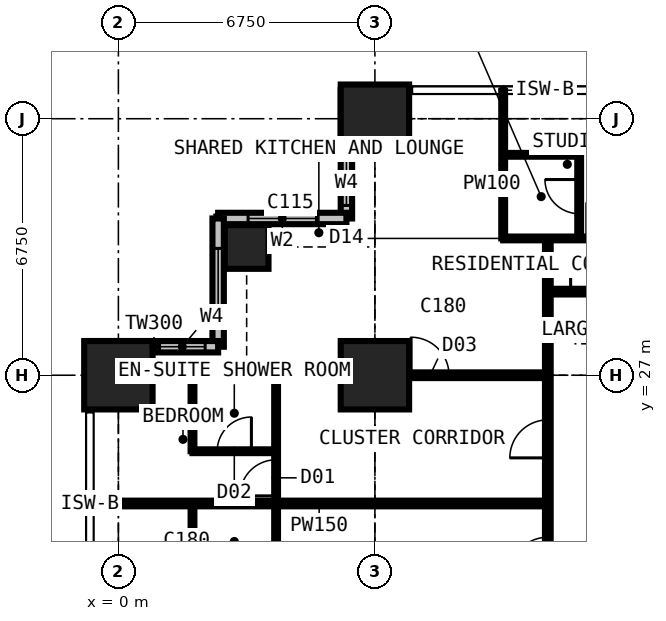
"""IFC4 building model, lengths in metres.
Left out: names, types, materials, properties, quantities, classifications, styles, units other than length and angle.
Written with IfcOpenShell. Run it as: python <this file> out.ifc"""

import sys

from ifc_helpers import new_model, si_unit, direction, frame, frame_2d, origin, origin_2d, place, context, subcontext, project, spatial, rectangle, extrude, element, fill, save


model = new_model("IFC4")
c1 = context("Model", 3, precision=1e-05, world=origin(), true_north=direction((0.0, 1.0)))
c2 = subcontext(c1, "Body", "Model", "MODEL_VIEW")
j1 = project(units=[si_unit("LENGTHUNIT", "METRE"), si_unit("PLANEANGLEUNIT", "RADIAN")], contexts=[c1])
p1 = place(None, origin())
s1 = spatial("IfcSite", under=j1, at=p1, CompositionType="ELEMENT")
p2 = place(p1, origin())
s2 = spatial("IfcBuilding", under=s1, at=p2, CompositionType="ELEMENT")
p3 = place(p2, frame((0.0, 0.0, 94.5)))
s3 = spatial("IfcBuildingStorey", under=s2, at=p3, CompositionType="ELEMENT", Elevation=94.5)
p4 = place(p3, frame((0.0, 27.0, 0.0), z_axis=(0.0, 0.0, 1.0), x_axis=(1.0, 0.0, 0.0)))
e1 = element("IfcColumn", 1, at=p4, inside=s3, PredefinedType="COLUMN", context=c2, shape_type="SweptSolid", body=[
    extrude(rectangle(XDim=1.8, YDim=1.8, at=origin_2d()), origin(), (0.0, 0.0, 1.0), 3.6),
])
p5 = place(p3, frame((3.375, 30.375, 0.0), z_axis=(0.0, 0.0, 1.0), x_axis=(1.0, 0.0, 0.0)))
e2 = element("IfcColumn", 2, at=p5, inside=s3, PredefinedType="COLUMN", context=c2, shape_type="SweptSolid", body=[
    extrude(rectangle(XDim=1.15, YDim=1.15, at=origin_2d()), origin(), (0.0, 0.0, 1.0), 3.6),
])
for number, where, z_axis, x_axis in (
    (3, (6.75, 27.0, 0.0), (0.0, 0.0, 1.0), (1.0, 0.0, 0.0)),
    (4, (6.75, 33.75, 0.0), (0.0, 0.0, 1.0), (1.0, 0.0, 0.0)),
):
    element("IfcColumn", number, at=place(p3, frame(where, z_axis=z_axis, x_axis=x_axis)), inside=s3, PredefinedType="COLUMN", context=c2, shape_type="SweptSolid", body=[
        extrude(rectangle(XDim=1.8, YDim=1.8, at=origin_2d()), origin(), (0.0, 0.0, 1.0), 3.6),
    ])
p6 = place(p3, frame((6.0, 34.5, 0.0), z_axis=(0.0, 0.0, 1.0), x_axis=(0.0, -1.0, 0.0)))
e5 = element("IfcWall", 5, at=p6, inside=s3, PredefinedType="SOLIDWALL", context=c2, shape_type="SweptSolid", body=[
    extrude(rectangle(XDim=3.375, YDim=0.3, at=frame_2d((1.688, 0.0))), origin(), (0.0, 0.0, 1.0), 3.375),
])
p7 = place(p6, frame((1.833, 0.0, 0.9)))
e6 = element("IfcOpeningElement", 6, at=p7, cuts=e5, PredefinedType="OPENING", context=c2, shape_type="SweptSolid", body=[
    extrude(rectangle(XDim=1.2, YDim=1.8, at=frame_2d((0.6, 0.9))), frame((0.0, 0.16, 0.0), z_axis=(0.0, -1.0, 0.0), x_axis=(1.0, 0.0, 0.0)), (0.0, 0.0, 1.0), 0.32),
])
p8 = place(p3, frame((6.0, 31.125, 0.0), z_axis=(0.0, 0.0, 1.0), x_axis=(-1.0, 0.0, 0.0)))
e7 = element("IfcWall", 7, at=p8, inside=s3, PredefinedType="SOLIDWALL", context=c2, shape_type="SweptSolid", body=[
    extrude(rectangle(XDim=3.375, YDim=0.3, at=frame_2d((1.688, 0.0))), origin(), (0.0, 0.0, 1.0), 3.375),
])
p9 = place(p8, frame((0.788, 0.0, 0.6)))
e8 = element("IfcOpeningElement", 8, at=p9, cuts=e7, PredefinedType="OPENING", context=c2, shape_type="SweptSolid", body=[
    extrude(rectangle(XDim=1.8, YDim=2.1, at=frame_2d((0.9, 1.05))), frame((0.0, 0.16, 0.0), z_axis=(0.0, -1.0, 0.0), x_axis=(1.0, 0.0, 0.0)), (0.0, 0.0, 1.0), 0.32),
])
p10 = place(p3, frame((2.625, 31.125, 0.0), z_axis=(0.0, 0.0, 1.0), x_axis=(0.0, -1.0, 0.0)))
e9 = element("IfcWall", 9, at=p10, inside=s3, PredefinedType="SOLIDWALL", context=c2, shape_type="SweptSolid", body=[
    extrude(rectangle(XDim=3.375, YDim=0.3, at=frame_2d((1.688, 0.0))), origin(), (0.0, 0.0, 1.0), 3.375),
])
p11 = place(p10, frame((0.788, 0.0, 0.6)))
e10 = element("IfcOpeningElement", 10, at=p11, cuts=e9, PredefinedType="OPENING", context=c2, shape_type="SweptSolid", body=[
    extrude(rectangle(XDim=1.8, YDim=2.1, at=frame_2d((0.9, 1.05))), frame((0.0, 0.16, 0.0), z_axis=(0.0, -1.0, 0.0), x_axis=(1.0, 0.0, 0.0)), (0.0, 0.0, 1.0), 0.32),
])
p12 = place(p3, frame((2.625, 27.75, 0.0), z_axis=(0.0, 0.0, 1.0), x_axis=(-1.0, 0.0, 0.0)))
e11 = element("IfcWall", 11, at=p12, inside=s3, PredefinedType="SOLIDWALL", context=c2, shape_type="SweptSolid", body=[
    extrude(rectangle(XDim=3.375, YDim=0.3, at=frame_2d((1.688, 0.0))), origin(), (0.0, 0.0, 1.0), 3.375),
])
p13 = place(p12, frame((0.343, 0.0, 0.9)))
e12 = element("IfcOpeningElement", 12, at=p13, cuts=e11, PredefinedType="OPENING", context=c2, shape_type="SweptSolid", body=[
    extrude(rectangle(XDim=1.2, YDim=1.8, at=frame_2d((0.6, 0.9))), frame((0.0, 0.16, 0.0), z_axis=(0.0, -1.0, 0.0), x_axis=(1.0, 0.0, 0.0)), (0.0, 0.0, 1.0), 0.32),
])
p14 = place(p3, frame((-0.734, 23.625, 0.0), z_axis=(0.0, 0.0, 1.0), x_axis=(1.0, 0.0, 0.0)))
e13 = element("IfcWall", 13, at=p14, inside=s3, PredefinedType="PARTITIONING", context=c2, shape_type="SweptSolid", body=[
    extrude(rectangle(XDim=12.034, YDim=0.15, at=frame_2d((6.017, 0.0))), origin(), (0.0, 0.0, 1.0), 3.375),
])
p15 = place(p3, frame((-0.734, 27.0, 0.0), z_axis=(0.0, 0.0, 1.0), x_axis=(1.0, 0.0, 0.0)))
e14 = element("IfcWall", 14, at=p15, inside=s3, PredefinedType="PARTITIONING", context=c2, shape_type="SweptSolid", body=[
    extrude(rectangle(XDim=12.034, YDim=0.15, at=frame_2d((6.017, 0.0))), origin(), (0.0, 0.0, 1.0), 2.806),
])
p16 = place(p15, frame((8.434, 0.0, 0.0)))
e15 = element("IfcOpeningElement", 15, at=p16, cuts=e14, PredefinedType="OPENING", context=c2, shape_type="SweptSolid", body=[
    extrude(rectangle(XDim=1.0, YDim=2.2, at=frame_2d((0.5, 1.1))), frame((0.0, 0.085, 0.0), z_axis=(0.0, -1.0, 0.0), x_axis=(1.0, 0.0, 0.0)), (0.0, 0.0, 1.0), 0.17),
])
for number, where, z_axis, x_axis in (
    (16, (1.95, 21.625, 0.0), (0.0, 0.0, 1.0), (0.0, 1.0, 0.0)),
    (17, (1.95, 25.0, 0.0), (0.0, 0.0, 1.0), (0.0, 1.0, 0.0)),
):
    element("IfcWall", number, at=place(p3, frame(where, z_axis=z_axis, x_axis=x_axis)), inside=s3, PredefinedType="PARTITIONING", context=c2, shape_type="SweptSolid", body=[
        extrude(rectangle(XDim=2.0, YDim=0.1, at=frame_2d((1.0, 0.0))), origin(), (0.0, 0.0, 1.0), 3.375),
    ])
p17 = place(p3, frame((1.95, 25.0, 0.0), z_axis=(0.0, 0.0, 1.0), x_axis=(1.0, 0.0, 0.0)))
e18 = element("IfcWall", 18, at=p17, inside=s3, PredefinedType="PARTITIONING", context=c2, shape_type="SweptSolid", body=[
    extrude(rectangle(XDim=2.2, YDim=0.1, at=frame_2d((1.1, 0.0))), origin(), (0.0, 0.0, 1.0), 3.375),
])
p18 = place(p17, frame((0.65, 0.0, 0.0)))
e19 = element("IfcOpeningElement", 19, at=p18, cuts=e18, PredefinedType="OPENING", context=c2, shape_type="SweptSolid", body=[
    extrude(rectangle(XDim=0.9, YDim=2.2, at=frame_2d((0.45, 1.1))), frame((0.0, 0.06, 0.0), z_axis=(0.0, -1.0, 0.0), x_axis=(1.0, 0.0, 0.0)), (0.0, 0.0, 1.0), 0.12),
])
p19 = place(p3, frame((4.15, 10.125, 0.0), z_axis=(0.0, 0.0, 1.0), x_axis=(0.0, 1.0, 0.0)))
e20 = element("IfcWall", 20, at=p19, inside=s3, PredefinedType="PARTITIONING", context=c2, shape_type="SweptSolid", body=[
    extrude(rectangle(XDim=16.875, YDim=0.1, at=frame_2d((8.438, 0.0))), origin(), (0.0, 0.0, 1.0), 3.375),
])
p20 = place(p19, frame((13.7, 0.0, 0.0)))
e21 = element("IfcOpeningElement", 21, at=p20, cuts=e20, PredefinedType="OPENING", context=c2, shape_type="SweptSolid", body=[
    extrude(rectangle(XDim=0.95, YDim=2.2, at=frame_2d((0.475, 1.1))), frame((0.0, 0.06, 0.0), z_axis=(0.0, -1.0, 0.0), x_axis=(1.0, 0.0, 0.0)), (0.0, 0.0, 1.0), 0.12),
])
p21 = place(p19, frame((0.2, 0.0, 0.0)))
e22 = element("IfcOpeningElement", 22, at=p21, cuts=e20, PredefinedType="OPENING", context=c2, shape_type="SweptSolid", body=[
    extrude(rectangle(XDim=0.95, YDim=2.2, at=frame_2d((0.475, 1.1))), frame((0.0, 0.06, 0.0), z_axis=(0.0, -1.0, 0.0), x_axis=(1.0, 0.0, 0.0)), (0.0, 0.0, 1.0), 0.12),
])
p22 = place(p19, frame((3.625, 0.0, 0.0)))
e23 = element("IfcOpeningElement", 23, at=p22, cuts=e20, PredefinedType="OPENING", context=c2, shape_type="SweptSolid", body=[
    extrude(rectangle(XDim=0.95, YDim=2.2, at=frame_2d((0.475, 1.1))), frame((0.0, 0.06, 0.0), z_axis=(0.0, -1.0, 0.0), x_axis=(1.0, 0.0, 0.0)), (0.0, 0.0, 1.0), 0.12),
])
p23 = place(p19, frame((7.0, 0.0, 0.0)))
e24 = element("IfcOpeningElement", 24, at=p23, cuts=e20, PredefinedType="OPENING", context=c2, shape_type="SweptSolid", body=[
    extrude(rectangle(XDim=0.95, YDim=2.2, at=frame_2d((0.475, 1.1))), frame((0.0, 0.06, 0.0), z_axis=(0.0, -1.0, 0.0), x_axis=(1.0, 0.0, 0.0)), (0.0, 0.0, 1.0), 0.12),
])
p24 = place(p19, frame((10.375, 0.0, 0.0)))
e25 = element("IfcOpeningElement", 25, at=p24, cuts=e20, PredefinedType="OPENING", context=c2, shape_type="SweptSolid", body=[
    extrude(rectangle(XDim=0.95, YDim=2.2, at=frame_2d((0.475, 1.1))), frame((0.0, 0.06, 0.0), z_axis=(0.0, -1.0, 0.0), x_axis=(1.0, 0.0, 0.0)), (0.0, 0.0, 1.0), 0.12),
])
p25 = place(p3, frame((10.125, 30.6, 0.0), z_axis=(0.0, 0.0, 1.0), x_axis=(0.0, 1.0, 0.0)))
e26 = element("IfcWall", 26, at=p25, inside=s3, PredefinedType="PARTITIONING", context=c2, shape_type="SweptSolid", body=[
    extrude(rectangle(XDim=3.884, YDim=0.1, at=frame_2d((1.942, 0.0))), origin(), (0.0, 0.0, 1.0), 3.375),
])
p26 = place(p3, frame((10.125, 30.6, 0.0), z_axis=(0.0, 0.0, 1.0), x_axis=(1.0, 0.0, 0.0)))
e27 = element("IfcWall", 27, at=p26, inside=s3, PredefinedType="PARTITIONING", context=c2, shape_type="SweptSolid", body=[
    extrude(rectangle(XDim=3.375, YDim=0.1, at=frame_2d((1.688, 0.0))), origin(), (0.0, 0.0, 1.0), 3.375),
])
p27 = place(p26, frame((2.2, 0.0, 0.0)))
e28 = element("IfcOpeningElement", 28, at=p27, cuts=e27, PredefinedType="OPENING", context=c2, shape_type="SweptSolid", body=[
    extrude(rectangle(XDim=0.95, YDim=2.2, at=frame_2d((0.475, 1.1))), frame((0.0, 0.06, 0.0), z_axis=(0.0, -1.0, 0.0), x_axis=(1.0, 0.0, 0.0)), (0.0, 0.0, 1.0), 0.12),
])
p28 = place(p3, frame((10.125, 32.8, 0.0), z_axis=(0.0, 0.0, 1.0), x_axis=(1.0, 0.0, 0.0)))
e29 = element("IfcWall", 29, at=p28, inside=s3, PredefinedType="PARTITIONING", context=c2, shape_type="SweptSolid", body=[
    extrude(rectangle(XDim=2.0, YDim=0.1, at=frame_2d((1.0, 0.0))), origin(), (0.0, 0.0, 1.0), 3.375),
])
p29 = place(p3, frame((11.3, 11.3, 0.0), z_axis=(0.0, 0.0, 1.0), x_axis=(0.0, 1.0, 0.0)))
e30 = element("IfcWall", 30, at=p29, inside=s3, PredefinedType="PARTITIONING", context=c2, shape_type="SweptSolid", body=[
    extrude(rectangle(XDim=19.3, YDim=0.15, at=frame_2d((9.65, 0.0))), origin(), (0.0, 0.0, 1.0), 3.375),
])
p30 = place(p29, frame((13.525, 0.0, 0.0)))
e31 = element("IfcOpeningElement", 31, at=p30, cuts=e30, PredefinedType="OPENING", context=c2, shape_type="SweptSolid", body=[
    extrude(rectangle(XDim=1.0, YDim=2.2, at=frame_2d((0.5, 1.1))), frame((0.0, 0.085, 0.0), z_axis=(0.0, -1.0, 0.0), x_axis=(1.0, 0.0, 0.0)), (0.0, 0.0, 1.0), 0.17),
])
p31 = place(p29, frame((10.438, 0.0, 0.0)))
e32 = element("IfcOpeningElement", 32, at=p31, cuts=e30, PredefinedType="OPENING", context=c2, shape_type="SweptSolid", body=[
    extrude(rectangle(XDim=1.0, YDim=2.2, at=frame_2d((0.5, 1.1))), frame((0.0, 0.085, 0.0), z_axis=(0.0, -1.0, 0.0), x_axis=(1.0, 0.0, 0.0)), (0.0, 0.0, 1.0), 0.17),
])
p32 = place(p3, frame((11.3, 29.2, 0.0), z_axis=(0.0, 0.0, 1.0), x_axis=(1.0, 0.0, 0.0)))
e33 = element("IfcWall", 33, at=p32, inside=s3, PredefinedType="PARTITIONING", context=c2, shape_type="SweptSolid", body=[
    extrude(rectangle(XDim=19.075, YDim=0.15, at=frame_2d((9.538, 0.0))), origin(), (0.0, 0.0, 1.0), 3.375),
])
p33 = place(p32, frame((6.4, 0.0, 0.0)))
e34 = element("IfcOpeningElement", 34, at=p33, cuts=e33, PredefinedType="OPENING", context=c2, shape_type="SweptSolid", body=[
    extrude(rectangle(XDim=0.95, YDim=2.2, at=frame_2d((0.475, 1.1))), frame((0.0, 0.085, 0.0), z_axis=(0.0, -1.0, 0.0), x_axis=(1.0, 0.0, 0.0)), (0.0, 0.0, 1.0), 0.17),
])
p34 = place(p32, frame((9.2, 0.0, 0.0)))
e35 = element("IfcOpeningElement", 35, at=p34, cuts=e33, PredefinedType="OPENING", context=c2, shape_type="SweptSolid", body=[
    extrude(rectangle(XDim=0.95, YDim=2.2, at=frame_2d((0.475, 1.1))), frame((0.0, 0.085, 0.0), z_axis=(0.0, -1.0, 0.0), x_axis=(1.0, 0.0, 0.0)), (0.0, 0.0, 1.0), 0.17),
])
p35 = place(p32, frame((0.6, 0.0, 0.0)))
e36 = element("IfcOpeningElement", 36, at=p35, cuts=e33, PredefinedType="OPENING", context=c2, shape_type="SweptSolid", body=[
    extrude(rectangle(XDim=1.0, YDim=2.2, at=frame_2d((0.5, 1.1))), frame((0.0, 0.085, 0.0), z_axis=(0.0, -1.0, 0.0), x_axis=(1.0, 0.0, 0.0)), (0.0, 0.0, 1.0), 0.17),
])
p36 = place(p3, frame((12.125, 30.6, 0.0), z_axis=(0.0, 0.0, 1.0), x_axis=(0.0, 1.0, 0.0)))
e37 = element("IfcWall", 37, at=p36, inside=s3, PredefinedType="PARTITIONING", context=c2, shape_type="SweptSolid", body=[
    extrude(rectangle(XDim=2.2, YDim=0.1, at=frame_2d((1.1, 0.0))), origin(), (0.0, 0.0, 1.0), 3.375),
])
p37 = place(p36, frame((0.65, 0.0, 0.0)))
e38 = element("IfcOpeningElement", 38, at=p37, cuts=e37, PredefinedType="OPENING", context=c2, shape_type="SweptSolid", body=[
    extrude(rectangle(XDim=0.9, YDim=2.2, at=frame_2d((0.45, 1.1))), frame((0.0, 0.06, 0.0), z_axis=(0.0, -1.0, 0.0), x_axis=(1.0, 0.0, 0.0)), (0.0, 0.0, 1.0), 0.12),
])
p38 = place(p7, origin())
e39 = element("IfcWindow", 39, at=p38, inside=s3, PartitioningType="SINGLE_PANEL", PredefinedType="WINDOW", context=c2, shape_type="SweptSolid", body=[
    extrude(rectangle(XDim=1.2, YDim=1.8, at=frame_2d((0.6, 0.9))), frame((0.0, 0.03, 0.0), z_axis=(0.0, -1.0, 0.0), x_axis=(1.0, 0.0, 0.0)), (0.0, 0.0, 1.0), 0.06),
])
fill(e6, e39)
p39 = place(p9, origin())
e40 = element("IfcWindow", 40, at=p39, inside=s3, PartitioningType="SINGLE_PANEL", PredefinedType="WINDOW", context=c2, shape_type="SweptSolid", body=[
    extrude(rectangle(XDim=1.8, YDim=2.1, at=frame_2d((0.9, 1.05))), frame((0.0, 0.03, 0.0), z_axis=(0.0, -1.0, 0.0), x_axis=(1.0, 0.0, 0.0)), (0.0, 0.0, 1.0), 0.06),
])
fill(e8, e40)
p40 = place(p11, origin())
e41 = element("IfcWindow", 41, at=p40, inside=s3, PartitioningType="SINGLE_PANEL", PredefinedType="WINDOW", context=c2, shape_type="SweptSolid", body=[
    extrude(rectangle(XDim=1.8, YDim=2.1, at=frame_2d((0.9, 1.05))), frame((0.0, 0.03, 0.0), z_axis=(0.0, -1.0, 0.0), x_axis=(1.0, 0.0, 0.0)), (0.0, 0.0, 1.0), 0.06),
])
fill(e10, e41)
p41 = place(p13, origin())
e42 = element("IfcWindow", 42, at=p41, inside=s3, PartitioningType="SINGLE_PANEL", PredefinedType="WINDOW", context=c2, shape_type="SweptSolid", body=[
    extrude(rectangle(XDim=1.2, YDim=1.8, at=frame_2d((0.6, 0.9))), frame((0.0, 0.03, 0.0), z_axis=(0.0, -1.0, 0.0), x_axis=(1.0, 0.0, 0.0)), (0.0, 0.0, 1.0), 0.06),
])
fill(e12, e42)
p42 = place(p37, origin())
e43 = element("IfcDoor", 43, at=p42, inside=s3, OperationType="SINGLE_SWING_RIGHT", PredefinedType="DOOR", context=c2, shape_type="SweptSolid", body=[
    extrude(rectangle(XDim=0.9, YDim=2.2, at=frame_2d((0.45, 1.1))), frame((0.0, 0.025, 0.0), z_axis=(0.0, -1.0, 0.0), x_axis=(1.0, 0.0, 0.0)), (0.0, 0.0, 1.0), 0.05),
])
fill(e38, e43)
p43 = place(p35, origin())
e44 = element("IfcDoor", 44, at=p43, inside=s3, OperationType="SINGLE_SWING_LEFT", PredefinedType="DOOR", context=c2, shape_type="SweptSolid", body=[
    extrude(rectangle(XDim=1.0, YDim=2.2, at=frame_2d((0.5, 1.1))), frame((0.0, 0.025, 0.0), z_axis=(0.0, -1.0, 0.0), x_axis=(1.0, 0.0, 0.0)), (0.0, 0.0, 1.0), 0.05),
])
fill(e36, e44)
p44 = place(p16, origin())
e45 = element("IfcDoor", 45, at=p44, inside=s3, OperationType="SINGLE_SWING_LEFT", PredefinedType="DOOR", context=c2, shape_type="SweptSolid", body=[
    extrude(rectangle(XDim=1.0, YDim=2.2, at=frame_2d((0.5, 1.1))), frame((0.0, 0.025, 0.0), z_axis=(0.0, -1.0, 0.0), x_axis=(1.0, 0.0, 0.0)), (0.0, 0.0, 1.0), 0.05),
])
fill(e15, e45)
p45 = place(p20, origin())
e46 = element("IfcDoor", 46, at=p45, inside=s3, OperationType="SINGLE_SWING_LEFT", PredefinedType="DOOR", context=c2, shape_type="SweptSolid", body=[
    extrude(rectangle(XDim=0.95, YDim=2.2, at=frame_2d((0.475, 1.1))), frame((0.0, 0.025, 0.0), z_axis=(0.0, -1.0, 0.0), x_axis=(1.0, 0.0, 0.0)), (0.0, 0.0, 1.0), 0.05),
])
fill(e21, e46)
p46 = place(p18, origin())
e47 = element("IfcDoor", 47, at=p46, inside=s3, OperationType="SINGLE_SWING_RIGHT", PredefinedType="DOOR", context=c2, shape_type="SweptSolid", body=[
    extrude(rectangle(XDim=0.9, YDim=2.2, at=frame_2d((0.45, 1.1))), frame((0.0, 0.025, 0.0), z_axis=(0.0, -1.0, 0.0), x_axis=(1.0, 0.0, 0.0)), (0.0, 0.0, 1.0), 0.05),
])
fill(e19, e47)
p47 = place(p30, origin())
e48 = element("IfcDoor", 48, at=p47, inside=s3, OperationType="SINGLE_SWING_LEFT", PredefinedType="DOOR", context=c2, shape_type="SweptSolid", body=[
    extrude(rectangle(XDim=1.0, YDim=2.2, at=frame_2d((0.5, 1.1))), frame((0.0, 0.025, 0.0), z_axis=(0.0, -1.0, 0.0), x_axis=(1.0, 0.0, 0.0)), (0.0, 0.0, 1.0), 0.05),
])
fill(e31, e48)
p48 = place(p31, origin())
e49 = element("IfcDoor", 49, at=p48, inside=s3, OperationType="SINGLE_SWING_LEFT", PredefinedType="DOOR", context=c2, shape_type="SweptSolid", body=[
    extrude(rectangle(XDim=1.0, YDim=2.2, at=frame_2d((0.5, 1.1))), frame((0.0, 0.025, 0.0), z_axis=(0.0, -1.0, 0.0), x_axis=(1.0, 0.0, 0.0)), (0.0, 0.0, 1.0), 0.05),
])
fill(e32, e49)
save(model, sys.argv[1])
